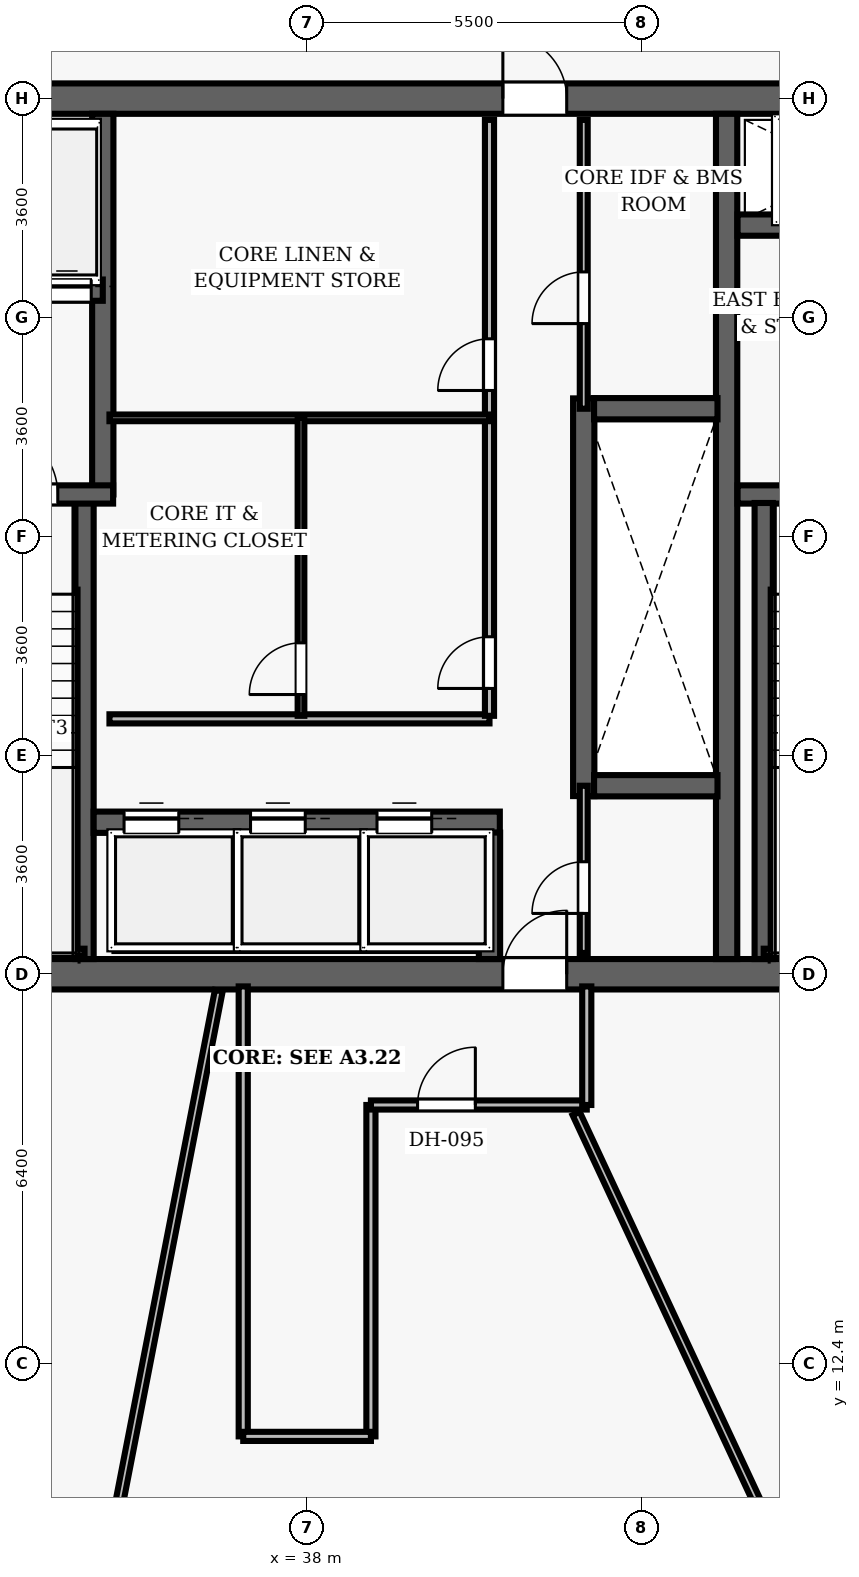
"""IFC4 building model, lengths in metres.
Left out: names, types, materials, properties, quantities, classifications, styles, units other than length and angle.
Written with IfcOpenShell. Run it as: python <this file> out.ifc"""

import sys

from ifc_helpers import new_model, si_unit, direction, frame, frame_2d, origin, place, context, subcontext, project, spatial, rectangle, extrude, element, fill, save


model = new_model("IFC4")
c1 = context("Model", 3, precision=1e-05, world=origin(), true_north=direction((0.0, 1.0)))
c2 = subcontext(c1, "Body", "Model", "MODEL_VIEW")
j1 = project(units=[si_unit("LENGTHUNIT", "METRE"), si_unit("PLANEANGLEUNIT", "RADIAN")], contexts=[c1])
p1 = place(None, origin())
s1 = spatial("IfcSite", under=j1, at=p1, CompositionType="ELEMENT")
p2 = place(p1, origin())
s2 = spatial("IfcBuilding", under=s1, at=p2, CompositionType="ELEMENT")
p3 = place(p2, frame((0.0, 0.0, 213.55)))
s3 = spatial("IfcBuildingStorey", under=s2, at=p3, CompositionType="ELEMENT", Elevation=213.55)
p4 = place(p3, frame((26.75, 18.8, 0.0), z_axis=(0.0, 0.0, 1.0), x_axis=(1.0, 0.0, 0.0)))
e1 = element("IfcWall", 1, at=p4, inside=s3, PredefinedType="SHEAR", context=c2, shape_type="SweptSolid", body=[
    extrude(rectangle(XDim=22.5, YDim=0.5, at=frame_2d((11.25, 0.0))), origin(), (0.0, 0.0, 1.0), 3.85),
])
p5 = place(p4, frame((14.47, 0.0, 0.0)))
e2 = element("IfcOpeningElement", 2, at=p5, cuts=e1, PredefinedType="OPENING", context=c2, shape_type="SweptSolid", body=[
    extrude(rectangle(XDim=1.05, YDim=2.15, at=frame_2d((0.525, 1.075))), frame((0.0, 0.26, 0.0), z_axis=(0.0, -1.0, 0.0), x_axis=(1.0, 0.0, 0.0)), (0.0, 0.0, 1.0), 0.52),
])
p6 = place(p3, frame((26.75, 33.2, 0.0), z_axis=(0.0, 0.0, 1.0), x_axis=(1.0, 0.0, 0.0)))
e3 = element("IfcWall", 3, at=p6, inside=s3, PredefinedType="SHEAR", context=c2, shape_type="SweptSolid", body=[
    extrude(rectangle(XDim=22.5, YDim=0.5, at=frame_2d((11.25, 0.0))), origin(), (0.0, 0.0, 1.0), 3.85),
])
p7 = place(p6, frame((4.57, 0.0, 0.0)))
e4 = element("IfcOpeningElement", 4, at=p7, cuts=e3, PredefinedType="OPENING", context=c2, shape_type="SweptSolid", body=[
    extrude(rectangle(XDim=1.05, YDim=2.15, at=frame_2d((0.525, 1.075))), frame((0.0, 0.26, 0.0), z_axis=(0.0, -1.0, 0.0), x_axis=(1.0, 0.0, 0.0)), (0.0, 0.0, 1.0), 0.52),
])
p8 = place(p6, frame((14.47, 0.0, 0.0)))
e5 = element("IfcOpeningElement", 5, at=p8, cuts=e3, PredefinedType="OPENING", context=c2, shape_type="SweptSolid", body=[
    extrude(rectangle(XDim=1.05, YDim=2.15, at=frame_2d((0.525, 1.075))), frame((0.0, 0.26, 0.0), z_axis=(0.0, -1.0, 0.0), x_axis=(1.0, 0.0, 0.0)), (0.0, 0.0, 1.0), 0.52),
])
p9 = place(p3, frame((44.9, 19.05, 0.0), z_axis=(0.0, 0.0, 1.0), x_axis=(0.0, 1.0, 0.0)))
e6 = element("IfcWall", 6, at=p9, inside=s3, PredefinedType="SHEAR", context=c2, shape_type="SweptSolid", body=[
    extrude(rectangle(XDim=13.9, YDim=0.35, at=frame_2d((6.95, 0.0))), origin(), (0.0, 0.0, 1.0), 3.85),
])
p10 = place(p3, frame((45.08, 26.69, 0.0), z_axis=(0.0, 0.0, 1.0), x_axis=(1.0, 0.0, 0.0)))
e7 = element("IfcWall", 7, at=p10, inside=s3, PredefinedType="SHEAR", context=c2, shape_type="SweptSolid", body=[
    extrude(rectangle(XDim=3.67, YDim=0.3, at=frame_2d((1.835, 0.0))), origin(), (0.0, 0.0, 1.0), 3.85),
])
p11 = place(p10, frame((1.05, 0.0, 0.0)))
e8 = element("IfcOpeningElement", 8, at=p11, cuts=e7, PredefinedType="OPENING", context=c2, shape_type="SweptSolid", body=[
    extrude(rectangle(XDim=1.1, YDim=2.15, at=frame_2d((0.55, 1.075))), frame((0.0, 0.16, 0.0), z_axis=(0.0, -1.0, 0.0), x_axis=(1.0, 0.0, 0.0)), (0.0, 0.0, 1.0), 0.32),
])
p12 = place(p3, frame((45.51, 19.05, 0.0), z_axis=(0.0, 0.0, 1.0), x_axis=(0.0, 1.0, 0.0)))
e9 = element("IfcWall", 9, at=p12, inside=s3, PredefinedType="SHEAR", context=c2, shape_type="SweptSolid", body=[
    extrude(rectangle(XDim=7.5, YDim=0.3, at=frame_2d((3.75, 0.0))), origin(), (0.0, 0.0, 1.0), 3.85),
])
p13 = place(p3, frame((45.51, 19.16, 0.0), z_axis=(0.0, 0.0, 1.0), x_axis=(1.0, 0.0, 0.0)))
e10 = element("IfcWall", 10, at=p13, inside=s3, PredefinedType="SHEAR", context=c2, shape_type="SweptSolid", body=[
    extrude(rectangle(XDim=3.095, YDim=0.12, at=frame_2d((1.547, 0.0))), origin(), (0.0, 0.0, 1.0), 3.85),
])
p14 = place(p3, frame((45.08, 31.12, 0.0), z_axis=(0.0, 0.0, 1.0), x_axis=(1.0, 0.0, 0.0)))
e11 = element("IfcWall", 11, at=p14, inside=s3, PredefinedType="SHEAR", context=c2, shape_type="SweptSolid", body=[
    extrude(rectangle(XDim=3.67, YDim=0.35, at=frame_2d((1.835, 0.0))), origin(), (0.0, 0.0, 1.0), 3.035),
])
p15 = place(p14, frame((1.25, 0.0, 0.0)))
e12 = element("IfcOpeningElement", 12, at=p15, cuts=e11, PredefinedType="OPENING", context=c2, shape_type="SweptSolid", body=[
    extrude(rectangle(XDim=1.1, YDim=2.15, at=frame_2d((0.55, 1.075))), frame((0.0, 0.185, 0.0), z_axis=(0.0, -1.0, 0.0), x_axis=(1.0, 0.0, 0.0)), (0.0, 0.0, 1.0), 0.37),
])
p16 = place(p3, frame((34.34, 19.05, 0.0), z_axis=(0.0, 0.0, 1.0), x_axis=(0.0, 1.0, 0.0)))
e13 = element("IfcWall", 13, at=p16, inside=s3, PredefinedType="SHEAR", context=c2, shape_type="SweptSolid", body=[
    extrude(rectangle(XDim=7.5, YDim=0.3, at=frame_2d((3.75, 0.0))), origin(), (0.0, 0.0, 1.0), 3.85),
])
p17 = place(p3, frame((34.64, 26.69, 0.0), z_axis=(0.0, 0.0, 1.0), x_axis=(0.0, 1.0, 0.0)))
e14 = element("IfcWall", 14, at=p17, inside=s3, PredefinedType="SHEAR", context=c2, shape_type="SweptSolid", body=[
    extrude(rectangle(XDim=6.26, YDim=0.35, at=frame_2d((3.13, 0.0))), origin(), (0.0, 0.0, 1.0), 3.85),
])
p18 = place(p3, frame((31.25, 26.69, 0.0), z_axis=(0.0, 0.0, 1.0), x_axis=(1.0, 0.0, 0.0)))
e15 = element("IfcWall", 15, at=p18, inside=s3, PredefinedType="SHEAR", context=c2, shape_type="SweptSolid", body=[
    extrude(rectangle(XDim=3.56, YDim=0.3, at=frame_2d((1.78, 0.0))), origin(), (0.0, 0.0, 1.0), 3.85),
])
p19 = place(p18, frame((1.55, 0.0, 0.0)))
e16 = element("IfcOpeningElement", 16, at=p19, cuts=e15, PredefinedType="OPENING", context=c2, shape_type="SweptSolid", body=[
    extrude(rectangle(XDim=1.1, YDim=2.15, at=frame_2d((0.55, 1.075))), frame((0.0, 0.16, 0.0), z_axis=(0.0, -1.0, 0.0), x_axis=(1.0, 0.0, 0.0)), (0.0, 0.0, 1.0), 0.32),
])
p20 = place(p3, frame((31.3, 19.16, 0.0), z_axis=(0.0, 0.0, 1.0), x_axis=(1.0, 0.0, 0.0)))
e17 = element("IfcWall", 17, at=p20, inside=s3, PredefinedType="SHEAR", context=c2, shape_type="SweptSolid", body=[
    extrude(rectangle(XDim=3.04, YDim=0.12, at=frame_2d((1.52, 0.0))), origin(), (0.0, 0.0, 1.0), 3.85),
])
p21 = place(p3, frame((32.23, 30.05, 0.0), z_axis=(0.0, 0.0, 1.0), x_axis=(1.0, 0.0, 0.0)))
e18 = element("IfcWall", 18, at=p21, inside=s3, PredefinedType="SHEAR", context=c2, shape_type="SweptSolid", body=[
    extrude(rectangle(XDim=2.41, YDim=0.35, at=frame_2d((1.205, 0.0))), origin(), (0.0, 0.0, 1.0), 3.035),
])
p22 = place(p21, frame((0.42, 0.0, 0.0)))
e19 = element("IfcOpeningElement", 19, at=p22, cuts=e18, PredefinedType="OPENING", context=c2, shape_type="SweptSolid", body=[
    extrude(rectangle(XDim=0.8, YDim=2.15, at=frame_2d((0.4, 1.075))), frame((0.0, 0.185, 0.0), z_axis=(0.0, -1.0, 0.0), x_axis=(1.0, 0.0, 0.0)), (0.0, 0.0, 1.0), 0.37),
])
p23 = place(p21, frame((1.42, 0.0, 0.0)))
e20 = element("IfcOpeningElement", 20, at=p23, cuts=e18, PredefinedType="OPENING", context=c2, shape_type="SweptSolid", body=[
    extrude(rectangle(XDim=0.8, YDim=2.15, at=frame_2d((0.4, 1.075))), frame((0.0, 0.185, 0.0), z_axis=(0.0, -1.0, 0.0), x_axis=(1.0, 0.0, 0.0)), (0.0, 0.0, 1.0), 0.37),
])
p24 = place(p3, frame((42.55, 21.73, 0.0), z_axis=(0.0, 0.0, 1.0), x_axis=(0.0, 1.0, 0.0)))
e21 = element("IfcWall", 21, at=p24, inside=s3, PredefinedType="SHEAR", context=c2, shape_type="SweptSolid", body=[
    extrude(rectangle(XDim=6.54, YDim=0.35, at=frame_2d((3.27, 0.0))), origin(), (0.0, 0.0, 1.0), 3.035),
])
for number, where, z_axis, x_axis in (
    (22, (42.72, 21.9, 0.0), (0.0, 0.0, 1.0), (1.0, 0.0, 0.0)),
    (23, (42.72, 28.1, 0.0), (0.0, 0.0, 1.0), (1.0, 0.0, 0.0)),
):
    element("IfcWall", number, at=place(p3, frame(where, z_axis=z_axis, x_axis=x_axis)), inside=s3, PredefinedType="SHEAR", context=c2, shape_type="SweptSolid", body=[
        extrude(rectangle(XDim=2.03, YDim=0.35, at=frame_2d((1.015, 0.0))), origin(), (0.0, 0.0, 1.0), 3.035),
    ])
p25 = place(p3, frame((34.49, 21.3, 0.0), z_axis=(0.0, 0.0, 1.0), x_axis=(1.0, 0.0, 0.0)))
e24 = element("IfcWall", 24, at=p25, inside=s3, PredefinedType="SHEAR", context=c2, shape_type="SweptSolid", body=[
    extrude(rectangle(XDim=6.68, YDim=0.35, at=frame_2d((3.34, 0.0))), origin(), (0.0, 0.0, 1.0), 3.035),
])
p26 = place(p25, frame((0.5, 0.0, 0.0)))
e25 = element("IfcOpeningElement", 25, at=p26, cuts=e24, PredefinedType="OPENING", context=c2, shape_type="SweptSolid", body=[
    extrude(rectangle(XDim=0.9, YDim=2.15, at=frame_2d((0.45, 1.075))), frame((0.0, 0.185, 0.0), z_axis=(0.0, -1.0, 0.0), x_axis=(1.0, 0.0, 0.0)), (0.0, 0.0, 1.0), 0.37),
])
p27 = place(p25, frame((2.58, 0.0, 0.0)))
e26 = element("IfcOpeningElement", 26, at=p27, cuts=e24, PredefinedType="OPENING", context=c2, shape_type="SweptSolid", body=[
    extrude(rectangle(XDim=0.9, YDim=2.15, at=frame_2d((0.45, 1.075))), frame((0.0, 0.185, 0.0), z_axis=(0.0, -1.0, 0.0), x_axis=(1.0, 0.0, 0.0)), (0.0, 0.0, 1.0), 0.37),
])
p28 = place(p25, frame((4.66, 0.0, 0.0)))
e27 = element("IfcOpeningElement", 27, at=p28, cuts=e24, PredefinedType="OPENING", context=c2, shape_type="SweptSolid", body=[
    extrude(rectangle(XDim=0.9, YDim=2.15, at=frame_2d((0.45, 1.075))), frame((0.0, 0.185, 0.0), z_axis=(0.0, -1.0, 0.0), x_axis=(1.0, 0.0, 0.0)), (0.0, 0.0, 1.0), 0.37),
])
p29 = place(p3, frame((41.0, 19.05, 0.0), z_axis=(0.0, 0.0, 1.0), x_axis=(0.0, 1.0, 0.0)))
e28 = element("IfcWall", 28, at=p29, inside=s3, PredefinedType="SHEAR", context=c2, shape_type="SweptSolid", body=[
    extrude(rectangle(XDim=2.08, YDim=0.35, at=frame_2d((1.04, 0.0))), origin(), (0.0, 0.0, 1.0), 3.035),
])
p30 = place(p3, frame((34.75, 23.0, 0.0), z_axis=(0.0, 0.0, 1.0), x_axis=(1.0, 0.0, 0.0)))
e29 = element("IfcWall", 29, at=p30, inside=s3, PredefinedType="PARTITIONING", context=c2, shape_type="SweptSolid", body=[
    extrude(rectangle(XDim=6.25, YDim=0.15, at=frame_2d((3.125, 0.0))), origin(), (0.0, 0.0, 1.0), 3.035),
])
p31 = place(p3, frame((41.0, 23.05, 0.0), z_axis=(0.0, 0.0, 1.0), x_axis=(0.0, 1.0, 0.0)))
e30 = element("IfcWall", 30, at=p31, inside=s3, PredefinedType="PARTITIONING", context=c2, shape_type="SweptSolid", body=[
    extrude(rectangle(XDim=9.8, YDim=0.15, at=frame_2d((4.9, 0.0))), origin(), (0.0, 0.0, 1.0), 3.035),
])
p32 = place(p31, frame((5.35, 0.0, 0.0)))
e31 = element("IfcOpeningElement", 31, at=p32, cuts=e30, PredefinedType="OPENING", context=c2, shape_type="SweptSolid", body=[
    extrude(rectangle(XDim=0.85, YDim=2.1, at=frame_2d((0.425, 1.05))), frame((0.0, 0.085, 0.0), z_axis=(0.0, -1.0, 0.0), x_axis=(1.0, 0.0, 0.0)), (0.0, 0.0, 1.0), 0.17),
])
p33 = place(p31, frame((0.45, 0.0, 0.0)))
e32 = element("IfcOpeningElement", 32, at=p33, cuts=e30, PredefinedType="OPENING", context=c2, shape_type="SweptSolid", body=[
    extrude(rectangle(XDim=0.85, YDim=2.1, at=frame_2d((0.425, 1.05))), frame((0.0, 0.085, 0.0), z_axis=(0.0, -1.0, 0.0), x_axis=(1.0, 0.0, 0.0)), (0.0, 0.0, 1.0), 0.17),
])
p34 = place(p3, frame((34.75, 27.95, 0.0), z_axis=(0.0, 0.0, 1.0), x_axis=(1.0, 0.0, 0.0)))
e33 = element("IfcWall", 33, at=p34, inside=s3, PredefinedType="PARTITIONING", context=c2, shape_type="SweptSolid", body=[
    extrude(rectangle(XDim=6.25, YDim=0.11, at=frame_2d((3.125, 0.0))), origin(), (0.0, 0.0, 1.0), 3.035),
])
p35 = place(p3, frame((37.9, 23.05, 0.0), z_axis=(0.0, 0.0, 1.0), x_axis=(0.0, 1.0, 0.0)))
e34 = element("IfcWall", 34, at=p35, inside=s3, PredefinedType="PARTITIONING", context=c2, shape_type="SweptSolid", body=[
    extrude(rectangle(XDim=4.9, YDim=0.11, at=frame_2d((2.45, 0.0))), origin(), (0.0, 0.0, 1.0), 3.035),
])
p36 = place(p35, frame((0.35, 0.0, 0.0)))
e35 = element("IfcOpeningElement", 35, at=p36, cuts=e34, PredefinedType="OPENING", context=c2, shape_type="SweptSolid", body=[
    extrude(rectangle(XDim=0.85, YDim=2.1, at=frame_2d((0.425, 1.05))), frame((0.0, 0.065, 0.0), z_axis=(0.0, -1.0, 0.0), x_axis=(1.0, 0.0, 0.0)), (0.0, 0.0, 1.0), 0.13),
])
p37 = place(p3, frame((42.55, 28.1, 0.0), z_axis=(0.0, 0.0, 1.0), x_axis=(0.0, 1.0, 0.0)))
e36 = element("IfcWall", 36, at=p37, inside=s3, PredefinedType="PARTITIONING", context=c2, shape_type="SweptSolid", body=[
    extrude(rectangle(XDim=4.75, YDim=0.13, at=frame_2d((2.375, 0.0))), origin(), (0.0, 0.0, 1.0), 3.035),
])
p38 = place(p37, frame((1.4, 0.0, 0.0)))
e37 = element("IfcOpeningElement", 37, at=p38, cuts=e36, PredefinedType="OPENING", context=c2, shape_type="SweptSolid", body=[
    extrude(rectangle(XDim=0.85, YDim=2.1, at=frame_2d((0.425, 1.05))), frame((0.0, 0.075, 0.0), z_axis=(0.0, -1.0, 0.0), x_axis=(1.0, 0.0, 0.0)), (0.0, 0.0, 1.0), 0.15),
])
p39 = place(p3, frame((42.55, 19.15, 0.0), z_axis=(0.0, 0.0, 1.0), x_axis=(0.0, 1.0, 0.0)))
e38 = element("IfcWall", 38, at=p39, inside=s3, PredefinedType="PARTITIONING", context=c2, shape_type="SweptSolid", body=[
    extrude(rectangle(XDim=2.75, YDim=0.13, at=frame_2d((1.375, 0.0))), origin(), (0.0, 0.0, 1.0), 3.035),
])
p40 = place(p39, frame((0.65, 0.0, 0.0)))
e39 = element("IfcOpeningElement", 39, at=p40, cuts=e38, PredefinedType="OPENING", context=c2, shape_type="SweptSolid", body=[
    extrude(rectangle(XDim=0.85, YDim=2.1, at=frame_2d((0.425, 1.05))), frame((0.0, 0.075, 0.0), z_axis=(0.0, -1.0, 0.0), x_axis=(1.0, 0.0, 0.0)), (0.0, 0.0, 1.0), 0.15),
])
p41 = place(p3, frame((36.95, 11.2, 0.0), z_axis=(0.0, 0.0, 1.0), x_axis=(0.0, 1.0, 0.0)))
e40 = element("IfcWall", 40, at=p41, inside=s3, PredefinedType="PARTITIONING", context=c2, shape_type="SweptSolid", body=[
    extrude(rectangle(XDim=7.4, YDim=0.15, at=frame_2d((3.7, 0.0))), origin(), (0.0, 0.0, 1.0), 3.035),
])
p42 = place(p3, frame((39.05, 11.2, 0.0), z_axis=(0.0, 0.0, 1.0), x_axis=(0.0, 1.0, 0.0)))
e41 = element("IfcWall", 41, at=p42, inside=s3, PredefinedType="PARTITIONING", context=c2, shape_type="SweptSolid", body=[
    extrude(rectangle(XDim=5.45, YDim=0.15, at=frame_2d((2.725, 0.0))), origin(), (0.0, 0.0, 1.0), 3.035),
])
p43 = place(p3, frame((39.05, 16.65, 0.0), z_axis=(0.0, 0.0, 1.0), x_axis=(1.0, 0.0, 0.0)))
e42 = element("IfcWall", 42, at=p43, inside=s3, PredefinedType="PARTITIONING", context=c2, shape_type="SweptSolid", body=[
    extrude(rectangle(XDim=3.55, YDim=0.15, at=frame_2d((1.775, 0.0))), origin(), (0.0, 0.0, 1.0), 3.035),
])
p44 = place(p43, frame((0.768, 0.0, 0.0)))
e43 = element("IfcOpeningElement", 43, at=p44, cuts=e42, PredefinedType="OPENING", context=c2, shape_type="SweptSolid", body=[
    extrude(rectangle(XDim=0.95, YDim=2.15, at=frame_2d((0.475, 1.075))), frame((0.0, 0.085, 0.0), z_axis=(0.0, -1.0, 0.0), x_axis=(1.0, 0.0, 0.0)), (0.0, 0.0, 1.0), 0.17),
])
p45 = place(p3, frame((42.6, 16.65, 0.0), z_axis=(0.0, 0.0, 1.0), x_axis=(0.0, 1.0, 0.0)))
e44 = element("IfcWall", 44, at=p45, inside=s3, PredefinedType="PARTITIONING", context=c2, shape_type="SweptSolid", body=[
    extrude(rectangle(XDim=1.95, YDim=0.15, at=frame_2d((0.975, 0.0))), origin(), (0.0, 0.0, 1.0), 3.035),
])
p46 = place(p3, frame((36.95, 11.2, 0.0), z_axis=(0.0, 0.0, 1.0), x_axis=(1.0, 0.0, 0.0)))
e45 = element("IfcWall", 45, at=p46, inside=s3, PredefinedType="PARTITIONING", context=c2, shape_type="SweptSolid", body=[
    extrude(rectangle(XDim=2.1, YDim=0.15, at=frame_2d((1.05, 0.0))), origin(), (0.0, 0.0, 1.0), 3.035),
])
p47 = place(p3, frame((36.548, 18.53, 0.0), z_axis=(0.0, 0.0, 1.0), x_axis=(-0.190822813374, -0.9816244974, 0.0)))
e46 = element("IfcWall", 46, at=p47, inside=s3, PredefinedType="PARTITIONING", context=c2, shape_type="SweptSolid", body=[
    extrude(rectangle(XDim=14.368, YDim=0.13, at=frame_2d((7.184, 0.0))), origin(), (0.0, 0.0, 1.0), 3.035),
])
p48 = place(p3, frame((42.425, 16.51, 0.0), z_axis=(0.0, 0.0, 1.0), x_axis=(0.422623131255, -0.906305516329, 0.0)))
e47 = element("IfcWall", 47, at=p48, inside=s3, PredefinedType="PARTITIONING", context=c2, shape_type="SweptSolid", body=[
    extrude(rectangle(XDim=14.266, YDim=0.13, at=frame_2d((7.133, 0.0))), origin(), (0.0, 0.0, 1.0), 3.035),
])
p49 = place(p19, origin())
e48 = element("IfcDoor", 48, at=p49, inside=s3, OperationType="SINGLE_SWING_LEFT", PredefinedType="DOOR", context=c2, shape_type="SweptSolid", body=[
    extrude(rectangle(XDim=1.1, YDim=2.15, at=frame_2d((0.55, 1.075))), frame((0.0, 0.025, 0.0), z_axis=(0.0, -1.0, 0.0), x_axis=(1.0, 0.0, 0.0)), (0.0, 0.0, 1.0), 0.05),
])
fill(e16, e48)
p50 = place(p8, origin())
e49 = element("IfcDoor", 49, at=p50, inside=s3, OperationType="SINGLE_SWING_LEFT", PredefinedType="DOOR", context=c2, shape_type="SweptSolid", body=[
    extrude(rectangle(XDim=1.05, YDim=2.15, at=frame_2d((0.525, 1.075))), frame((0.0, 0.025, 0.0), z_axis=(0.0, -1.0, 0.0), x_axis=(1.0, 0.0, 0.0)), (0.0, 0.0, 1.0), 0.05),
])
fill(e5, e49)
p51 = place(p5, origin())
e50 = element("IfcDoor", 50, at=p51, inside=s3, OperationType="SINGLE_SWING_RIGHT", PredefinedType="DOOR", context=c2, shape_type="SweptSolid", body=[
    extrude(rectangle(XDim=1.05, YDim=2.15, at=frame_2d((0.525, 1.075))), frame((0.0, 0.025, 0.0), z_axis=(0.0, -1.0, 0.0), x_axis=(1.0, 0.0, 0.0)), (0.0, 0.0, 1.0), 0.05),
])
fill(e2, e50)
p52 = place(p32, origin())
e51 = element("IfcDoor", 51, at=p52, inside=s3, OperationType="SINGLE_SWING_LEFT", PredefinedType="DOOR", context=c2, shape_type="SweptSolid", body=[
    extrude(rectangle(XDim=0.85, YDim=2.1, at=frame_2d((0.425, 1.05))), frame((0.0, 0.025, 0.0), z_axis=(0.0, -1.0, 0.0), x_axis=(1.0, 0.0, 0.0)), (0.0, 0.0, 1.0), 0.05),
])
fill(e31, e51)
p53 = place(p33, origin())
e52 = element("IfcDoor", 52, at=p53, inside=s3, OperationType="SINGLE_SWING_LEFT", PredefinedType="DOOR", context=c2, shape_type="SweptSolid", body=[
    extrude(rectangle(XDim=0.85, YDim=2.1, at=frame_2d((0.425, 1.05))), frame((0.0, 0.025, 0.0), z_axis=(0.0, -1.0, 0.0), x_axis=(1.0, 0.0, 0.0)), (0.0, 0.0, 1.0), 0.05),
])
fill(e32, e52)
p54 = place(p36, origin())
e53 = element("IfcDoor", 53, at=p54, inside=s3, OperationType="SINGLE_SWING_LEFT", PredefinedType="DOOR", context=c2, shape_type="SweptSolid", body=[
    extrude(rectangle(XDim=0.85, YDim=2.1, at=frame_2d((0.425, 1.05))), frame((0.0, 0.025, 0.0), z_axis=(0.0, -1.0, 0.0), x_axis=(1.0, 0.0, 0.0)), (0.0, 0.0, 1.0), 0.05),
])
fill(e35, e53)
p55 = place(p38, origin())
e54 = element("IfcDoor", 54, at=p55, inside=s3, OperationType="SINGLE_SWING_LEFT", PredefinedType="DOOR", context=c2, shape_type="SweptSolid", body=[
    extrude(rectangle(XDim=0.85, YDim=2.1, at=frame_2d((0.425, 1.05))), frame((0.0, 0.025, 0.0), z_axis=(0.0, -1.0, 0.0), x_axis=(1.0, 0.0, 0.0)), (0.0, 0.0, 1.0), 0.05),
])
fill(e37, e54)
p56 = place(p40, origin())
e55 = element("IfcDoor", 55, at=p56, inside=s3, OperationType="SINGLE_SWING_LEFT", PredefinedType="DOOR", context=c2, shape_type="SweptSolid", body=[
    extrude(rectangle(XDim=0.85, YDim=2.1, at=frame_2d((0.425, 1.05))), frame((0.0, 0.025, 0.0), z_axis=(0.0, -1.0, 0.0), x_axis=(1.0, 0.0, 0.0)), (0.0, 0.0, 1.0), 0.05),
])
fill(e39, e55)
p57 = place(p44, origin())
e56 = element("IfcDoor", 56, at=p57, inside=s3, OperationType="SINGLE_SWING_RIGHT", PredefinedType="DOOR", context=c2, shape_type="SweptSolid", body=[
    extrude(rectangle(XDim=0.95, YDim=2.15, at=frame_2d((0.475, 1.075))), frame((0.0, 0.025, 0.0), z_axis=(0.0, -1.0, 0.0), x_axis=(1.0, 0.0, 0.0)), (0.0, 0.0, 1.0), 0.05),
])
fill(e43, e56)
p58 = place(p26, origin())
e57 = element("IfcDoor", 57, at=p58, inside=s3, OperationType="SLIDING_TO_LEFT", PredefinedType="DOOR", context=c2, shape_type="SweptSolid", body=[
    extrude(rectangle(XDim=0.9, YDim=2.15, at=frame_2d((0.45, 1.075))), frame((0.0, 0.025, 0.0), z_axis=(0.0, -1.0, 0.0), x_axis=(1.0, 0.0, 0.0)), (0.0, 0.0, 1.0), 0.05),
])
fill(e25, e57)
p59 = place(p27, origin())
e58 = element("IfcDoor", 58, at=p59, inside=s3, OperationType="SLIDING_TO_LEFT", PredefinedType="DOOR", context=c2, shape_type="SweptSolid", body=[
    extrude(rectangle(XDim=0.9, YDim=2.15, at=frame_2d((0.45, 1.075))), frame((0.0, 0.025, 0.0), z_axis=(0.0, -1.0, 0.0), x_axis=(1.0, 0.0, 0.0)), (0.0, 0.0, 1.0), 0.05),
])
fill(e26, e58)
p60 = place(p28, origin())
e59 = element("IfcDoor", 59, at=p60, inside=s3, OperationType="SLIDING_TO_LEFT", PredefinedType="DOOR", context=c2, shape_type="SweptSolid", body=[
    extrude(rectangle(XDim=0.9, YDim=2.15, at=frame_2d((0.45, 1.075))), frame((0.0, 0.025, 0.0), z_axis=(0.0, -1.0, 0.0), x_axis=(1.0, 0.0, 0.0)), (0.0, 0.0, 1.0), 0.05),
])
fill(e27, e59)
p61 = place(p23, origin())
e60 = element("IfcDoor", 60, at=p61, inside=s3, OperationType="SLIDING_TO_LEFT", PredefinedType="DOOR", context=c2, shape_type="SweptSolid", body=[
    extrude(rectangle(XDim=0.8, YDim=2.15, at=frame_2d((0.4, 1.075))), frame((0.0, 0.025, 0.0), z_axis=(0.0, -1.0, 0.0), x_axis=(1.0, 0.0, 0.0)), (0.0, 0.0, 1.0), 0.05),
])
fill(e20, e60)
save(model, sys.argv[1])
